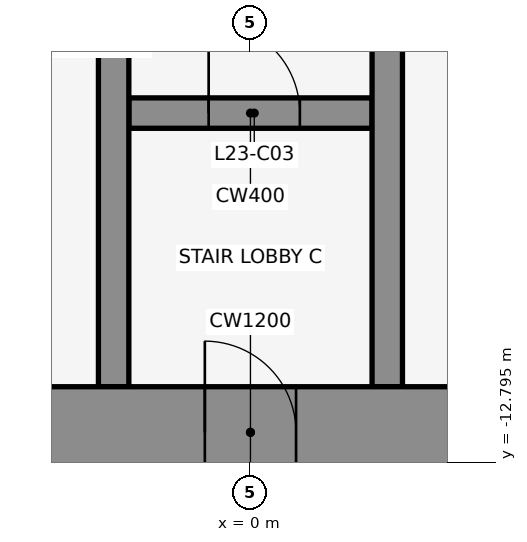
"""IFC4 building model, lengths in metres.
Left out: names, types, materials, properties, quantities, classifications, styles, units other than length and angle.
Written with IfcOpenShell. Run it as: python <this file> out.ifc"""

import sys

from ifc_helpers import new_model, si_unit, direction, frame, frame_2d, origin, place, context, subcontext, project, spatial, rectangle, extrude, element, fill, save


model = new_model("IFC4")
c1 = context("Model", 3, precision=1e-05, world=origin(), true_north=direction((0.0, 1.0)))
c2 = subcontext(c1, "Body", "Model", "MODEL_VIEW")
j1 = project(units=[si_unit("LENGTHUNIT", "METRE"), si_unit("PLANEANGLEUNIT", "RADIAN")], contexts=[c1])
p1 = place(None, origin())
s1 = spatial("IfcSite", under=j1, at=p1, CompositionType="ELEMENT")
p2 = place(p1, origin())
s2 = spatial("IfcBuilding", under=s1, at=p2, CompositionType="ELEMENT")
p3 = place(p2, frame((0.0, 0.0, 110.4)))
s3 = spatial("IfcBuildingStorey", under=s2, at=p3, CompositionType="ELEMENT", Elevation=110.4)
p4 = place(p3, frame((-1.6, -8.2, 0.0), z_axis=(0.0, 0.0, 1.0), x_axis=(1.0, 0.0, 0.0)))
e1 = element("IfcWall", 1, at=p4, inside=s3, PredefinedType="SHEAR", context=c2, shape_type="SweptSolid", body=[
    extrude(rectangle(XDim=3.2, YDim=0.4, at=frame_2d((1.6, 0.0))), origin(), (0.0, 0.0, 1.0), 4.1),
])
p5 = place(p4, frame((1.05, 0.0, 0.0)))
e2 = element("IfcOpeningElement", 2, at=p5, cuts=e1, PredefinedType="OPENING", context=c2, shape_type="SweptSolid", body=[
    extrude(rectangle(XDim=1.2, YDim=2.1, at=frame_2d((0.6, 1.05))), frame((0.0, 0.212, 0.0), z_axis=(0.0, -1.0, 0.0), x_axis=(1.0, 0.0, 0.0)), (0.0, 0.0, 1.0), 0.424),
])
for number, where, z_axis, x_axis in (
    (3, (-1.8, -11.8, 0.0), (0.0, 0.0, 1.0), (0.0, 1.0, 0.0)),
    (4, (1.8, -11.8, 0.0), (0.0, 0.0, 1.0), (0.0, 1.0, 0.0)),
):
    element("IfcWall", number, at=place(p3, frame(where, z_axis=z_axis, x_axis=x_axis)), inside=s3, PredefinedType="SHEAR", context=c2, shape_type="SweptSolid", body=[
        extrude(rectangle(XDim=10.6, YDim=0.4, at=frame_2d((5.3, 0.0))), origin(), (0.0, 0.0, 1.0), 4.1),
    ])
p6 = place(p3, frame((-22.0, -12.4, 0.0), z_axis=(0.0, 0.0, 1.0), x_axis=(1.0, 0.0, 0.0)))
e5 = element("IfcWall", 5, at=p6, inside=s3, PredefinedType="SHEAR", context=c2, shape_type="SweptSolid", body=[
    extrude(rectangle(XDim=44.0, YDim=1.2, at=frame_2d((22.0, 0.0))), origin(), (0.0, 0.0, 1.0), 4.1),
])
p7 = place(p6, frame((2.2, 0.0, 0.0)))
e6 = element("IfcOpeningElement", 6, at=p7, cuts=e5, PredefinedType="OPENING", context=c2, shape_type="SweptSolid", body=[
    extrude(rectangle(XDim=1.2, YDim=2.1, at=frame_2d((0.6, 1.05))), frame((0.0, 0.612, 0.0), z_axis=(0.0, -1.0, 0.0), x_axis=(1.0, 0.0, 0.0)), (0.0, 0.0, 1.0), 1.224),
])
p8 = place(p6, frame((21.4, 0.0, 0.0)))
e7 = element("IfcOpeningElement", 7, at=p8, cuts=e5, PredefinedType="OPENING", context=c2, shape_type="SweptSolid", body=[
    extrude(rectangle(XDim=1.2, YDim=2.1, at=frame_2d((0.6, 1.05))), frame((0.0, 0.612, 0.0), z_axis=(0.0, -1.0, 0.0), x_axis=(1.0, 0.0, 0.0)), (0.0, 0.0, 1.0), 1.224),
])
p9 = place(p6, frame((40.6, 0.0, 0.0)))
e8 = element("IfcOpeningElement", 8, at=p9, cuts=e5, PredefinedType="OPENING", context=c2, shape_type="SweptSolid", body=[
    extrude(rectangle(XDim=1.2, YDim=2.1, at=frame_2d((0.6, 1.05))), frame((0.0, 0.612, 0.0), z_axis=(0.0, -1.0, 0.0), x_axis=(1.0, 0.0, 0.0)), (0.0, 0.0, 1.0), 1.224),
])
p10 = place(p6, frame((16.0, 0.0, 0.0)))
e9 = element("IfcOpeningElement", 9, at=p10, cuts=e5, PredefinedType="OPENING", context=c2, shape_type="SweptSolid", body=[
    extrude(rectangle(XDim=1.8, YDim=2.1, at=frame_2d((0.9, 1.05))), frame((0.0, 0.612, 0.0), z_axis=(0.0, -1.0, 0.0), x_axis=(1.0, 0.0, 0.0)), (0.0, 0.0, 1.0), 1.224),
])
p11 = place(p6, frame((6.3, 0.0, 0.0)))
e10 = element("IfcOpeningElement", 10, at=p11, cuts=e5, PredefinedType="OPENING", context=c2, shape_type="SweptSolid", body=[
    extrude(rectangle(XDim=1.2, YDim=2.1, at=frame_2d((0.6, 1.05))), frame((0.0, 0.612, 0.0), z_axis=(0.0, -1.0, 0.0), x_axis=(1.0, 0.0, 0.0)), (0.0, 0.0, 1.0), 1.224),
])
p12 = place(p6, frame((26.2, 0.0, 0.0)))
e11 = element("IfcOpeningElement", 11, at=p12, cuts=e5, PredefinedType="OPENING", context=c2, shape_type="SweptSolid", body=[
    extrude(rectangle(XDim=1.8, YDim=2.1, at=frame_2d((0.9, 1.05))), frame((0.0, 0.612, 0.0), z_axis=(0.0, -1.0, 0.0), x_axis=(1.0, 0.0, 0.0)), (0.0, 0.0, 1.0), 1.224),
])
p13 = place(p6, frame((36.5, 0.0, 0.0)))
e12 = element("IfcOpeningElement", 12, at=p13, cuts=e5, PredefinedType="OPENING", context=c2, shape_type="SweptSolid", body=[
    extrude(rectangle(XDim=1.2, YDim=2.1, at=frame_2d((0.6, 1.05))), frame((0.0, 0.612, 0.0), z_axis=(0.0, -1.0, 0.0), x_axis=(1.0, 0.0, 0.0)), (0.0, 0.0, 1.0), 1.224),
])
p14 = place(p5, origin())
e13 = element("IfcDoor", 13, at=p14, inside=s3, OperationType="SINGLE_SWING_LEFT", PredefinedType="DOOR", context=c2, shape_type="SweptSolid", body=[
    extrude(rectangle(XDim=1.2, YDim=2.1, at=frame_2d((0.6, 1.05))), frame((0.0, 0.025, 0.0), z_axis=(0.0, -1.0, 0.0), x_axis=(1.0, 0.0, 0.0)), (0.0, 0.0, 1.0), 0.05),
])
fill(e2, e13)
p15 = place(p8, frame((1.2, 0.0, 0.0), z_axis=(0.0, 0.0, 1.0), x_axis=(-1.0, 0.0, 0.0)))
e14 = element("IfcDoor", 14, at=p15, inside=s3, OperationType="SINGLE_SWING_RIGHT", PredefinedType="DOOR", context=c2, shape_type="SweptSolid", body=[
    extrude(rectangle(XDim=1.2, YDim=2.1, at=frame_2d((0.6, 1.05))), frame((0.0, 0.025, 0.0), z_axis=(0.0, -1.0, 0.0), x_axis=(1.0, 0.0, 0.0)), (0.0, 0.0, 1.0), 0.05),
])
fill(e7, e14)
save(model, sys.argv[1])
